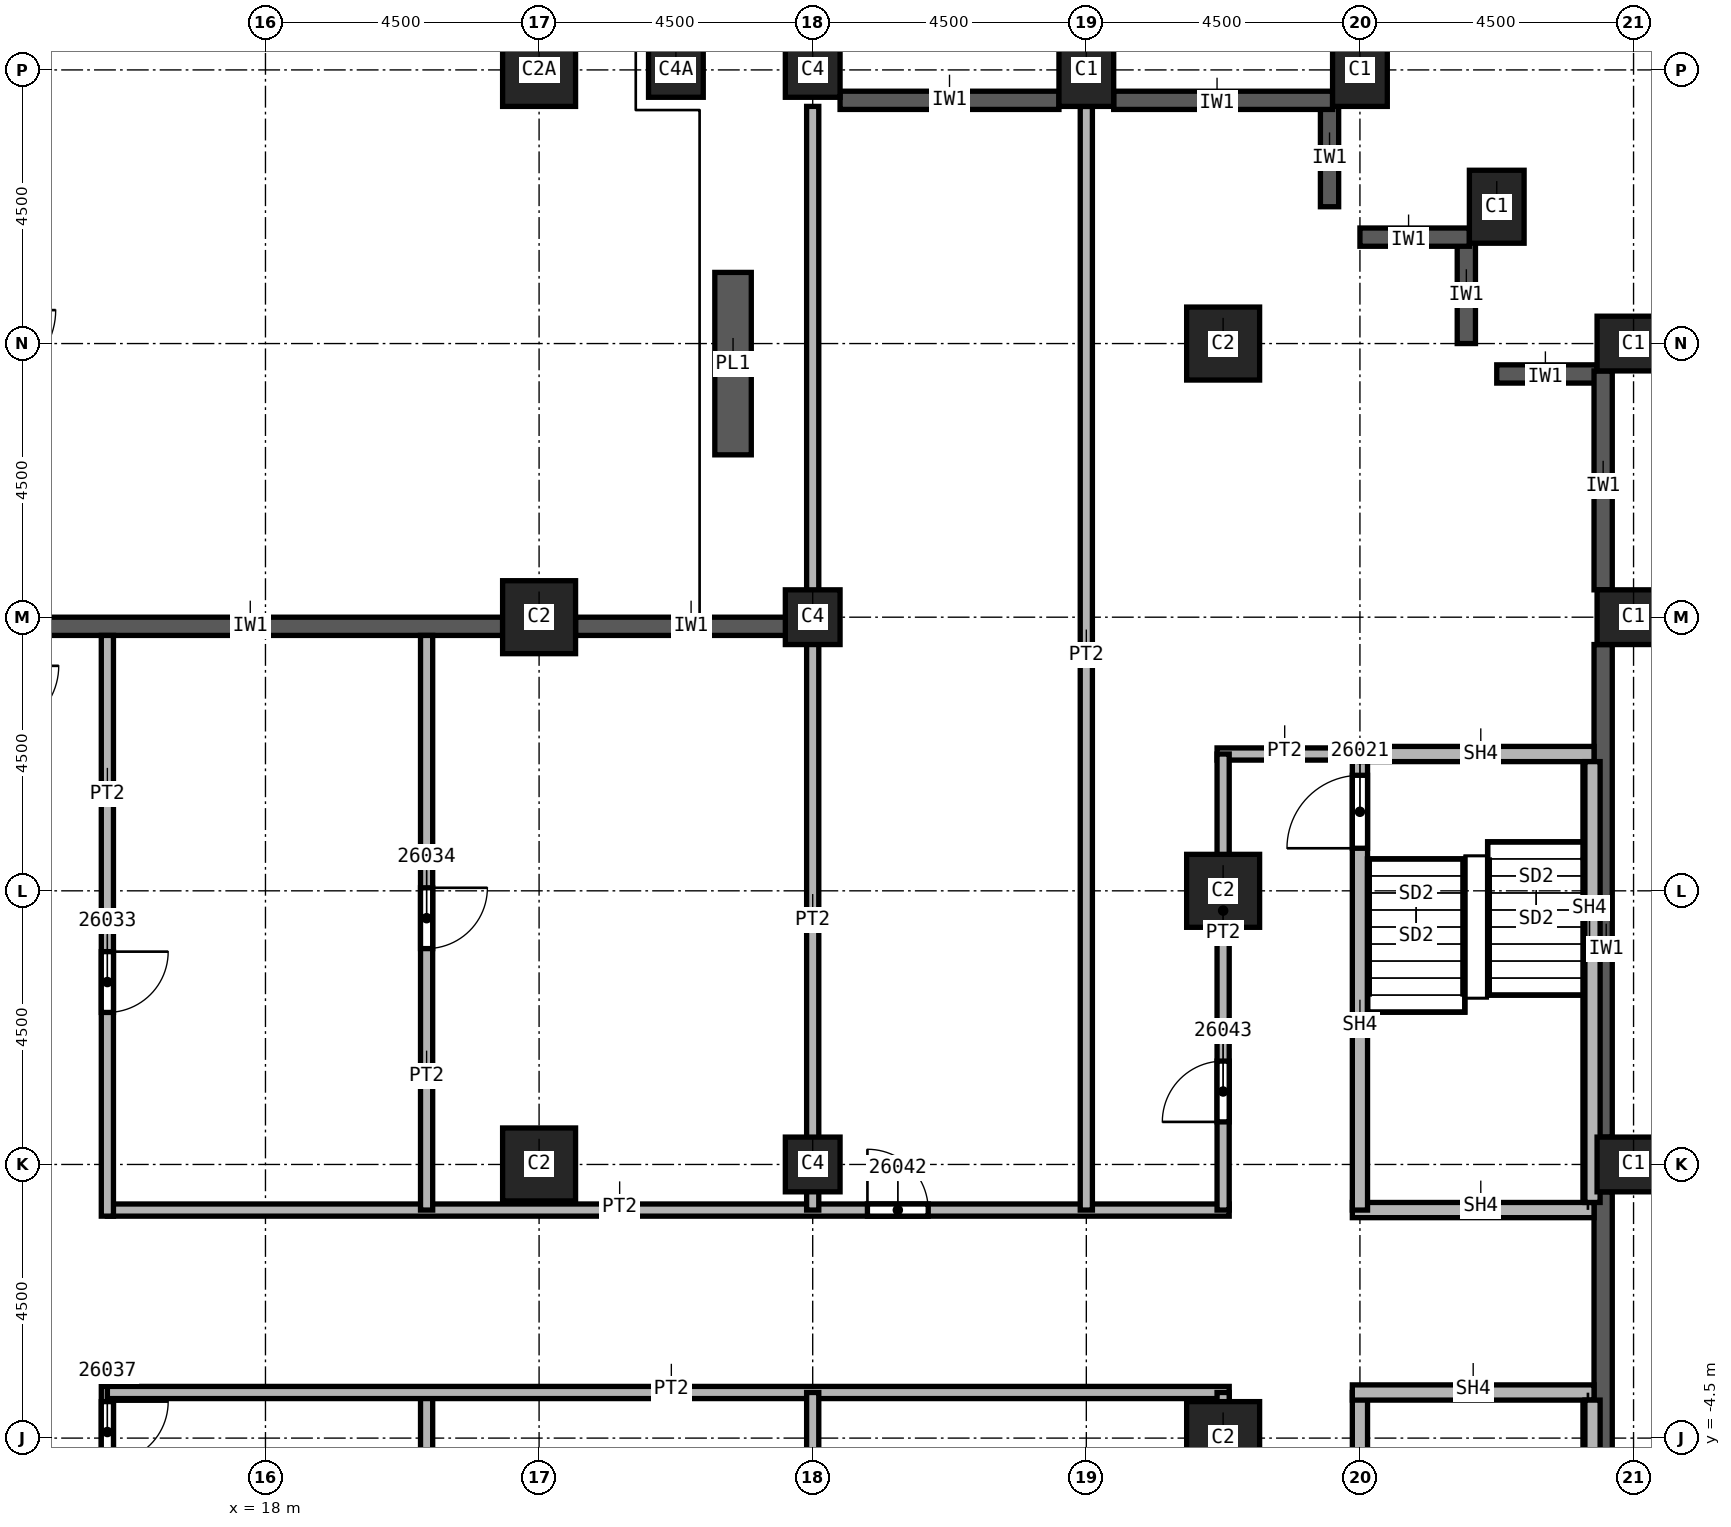
"""IFC4 building model, lengths in metres.
Left out: names, types, materials, properties, quantities, classifications, styles, units other than length and angle.
Written with IfcOpenShell. Run it as: python <this file> out.ifc"""

import sys

from ifc_helpers import new_model, si_unit, direction, frame, frame_2d, origin, origin_2d, place, context, subcontext, project, spatial, rectangle, extrude, element, fill, save


model = new_model("IFC4")
c1 = context("Model", 3, precision=1e-05, world=origin(), true_north=direction((0.0, 1.0)))
c2 = subcontext(c1, "Body", "Model", "MODEL_VIEW")
j1 = project(units=[si_unit("LENGTHUNIT", "METRE"), si_unit("PLANEANGLEUNIT", "RADIAN")], contexts=[c1])
p1 = place(None, origin())
s1 = spatial("IfcSite", under=j1, at=p1, CompositionType="ELEMENT")
p2 = place(p1, origin())
s2 = spatial("IfcBuilding", under=s1, at=p2, CompositionType="ELEMENT")
p3 = place(p2, frame((0.0, 0.0, 120.0)))
s3 = spatial("IfcBuildingStorey", under=s2, at=p3, CompositionType="ELEMENT", Elevation=120.0)
for number, where, z_axis, x_axis in (
    (1, (40.5, 0.0, 0.0), (0.0, 0.0, 1.0), (0.0, 1.0, 0.0)),
    (2, (40.5, 9.0, 0.0), (0.0, 0.0, 1.0), (0.0, 1.0, 0.0)),
    (3, (40.5, 13.5, 0.0), (0.0, 0.0, 1.0), (0.0, 1.0, 0.0)),
    (4, (38.25, 15.75, 0.0), (0.0, 0.0, 1.0), (1.0, 0.0, 0.0)),
    (5, (31.5, 18.0, 0.0), (0.0, 0.0, 1.0), (1.0, 0.0, 0.0)),
    (6, (36.0, 18.0, 0.0), (0.0, 0.0, 1.0), (1.0, 0.0, 0.0)),
):
    element("IfcColumn", number, at=place(p3, frame(where, z_axis=z_axis, x_axis=x_axis)), inside=s3, PredefinedType="COLUMN", context=c2, shape_type="SweptSolid", body=[
        extrude(rectangle(XDim=0.9, YDim=1.2, at=origin_2d()), origin(), (0.0, 0.0, 1.0), 5.7),
    ])
for number, where, z_axis, x_axis in (
    (7, (33.75, 4.5, 0.0), (0.0, 0.0, 1.0), (1.0, 0.0, 0.0)),
    (8, (33.75, 13.5, 0.0), (0.0, 0.0, 1.0), (1.0, 0.0, 0.0)),
    (9, (33.75, -4.5, 0.0), (0.0, 0.0, 1.0), (1.0, 0.0, 0.0)),
    (10, (22.5, 0.0, 0.0), (0.0, 0.0, 1.0), (1.0, 0.0, 0.0)),
    (11, (22.5, 9.0, 0.0), (0.0, 0.0, 1.0), (1.0, 0.0, 0.0)),
):
    element("IfcColumn", number, at=place(p3, frame(where, z_axis=z_axis, x_axis=x_axis)), inside=s3, PredefinedType="COLUMN", context=c2, shape_type="SweptSolid", body=[
        extrude(rectangle(XDim=1.2, YDim=1.2, at=origin_2d()), origin(), (0.0, 0.0, 1.0), 5.7),
    ])
p4 = place(p3, frame((22.5, 18.0, 0.0), z_axis=(0.0, 0.0, 1.0), x_axis=(1.0, 0.0, 0.0)))
e12 = element("IfcColumn", 12, at=p4, inside=s3, PredefinedType="COLUMN", context=c2, shape_type="SweptSolid", body=[
    extrude(rectangle(XDim=1.2, YDim=1.2, at=origin_2d()), origin(), (0.0, 0.0, 1.0), 6.0),
])
for number, where, z_axis, x_axis in (
    (13, (27.0, 0.0, 0.0), (0.0, 0.0, 1.0), (1.0, 0.0, 0.0)),
    (14, (27.0, 9.0, 0.0), (0.0, 0.0, 1.0), (1.0, 0.0, 0.0)),
    (15, (27.0, 18.0, 0.0), (0.0, 0.0, 1.0), (1.0, 0.0, 0.0)),
):
    element("IfcColumn", number, at=place(p3, frame(where, z_axis=z_axis, x_axis=x_axis)), inside=s3, PredefinedType="COLUMN", context=c2, shape_type="SweptSolid", body=[
        extrude(rectangle(XDim=0.9, YDim=0.9, at=origin_2d()), origin(), (0.0, 0.0, 1.0), 5.7),
    ])
p5 = place(p3, frame((24.75, 18.0, 0.0), z_axis=(0.0, 0.0, 1.0), x_axis=(1.0, 0.0, 0.0)))
e16 = element("IfcColumn", 16, at=p5, inside=s3, PredefinedType="COLUMN", context=c2, shape_type="SweptSolid", body=[
    extrude(rectangle(XDim=0.9, YDim=0.9, at=origin_2d()), origin(), (0.0, 0.0, 1.0), 6.0),
])
p6 = place(p3, frame((39.9, 13.0, 0.0), z_axis=(0.0, 0.0, 1.0), x_axis=(-1.0, 0.0, 0.0)))
e17 = element("IfcWall", 17, at=p6, inside=s3, PredefinedType="SOLIDWALL", context=c2, shape_type="SweptSolid", body=[
    extrude(rectangle(XDim=1.65, YDim=0.3, at=frame_2d((0.825, 0.0))), origin(), (0.0, 0.0, 1.0), 5.1),
])
for number, where, z_axis, x_axis in (
    (18, (37.75, 15.3, 0.0), (0.0, 0.0, 1.0), (0.0, -1.0, 0.0)),
    (19, (37.8, 15.25, 0.0), (0.0, 0.0, 1.0), (-1.0, 0.0, 0.0)),
    (20, (35.5, 17.55, 0.0), (0.0, 0.0, 1.0), (0.0, -1.0, 0.0)),
):
    element("IfcWall", number, at=place(p3, frame(where, z_axis=z_axis, x_axis=x_axis)), inside=s3, PredefinedType="SOLIDWALL", context=c2, shape_type="SweptSolid", body=[
        extrude(rectangle(XDim=1.8, YDim=0.3, at=frame_2d((0.9, 0.0))), origin(), (0.0, 0.0, 1.0), 5.1),
    ])
for number, where, z_axis, x_axis in (
    (21, (40.0, -8.55, 0.0), (0.0, 0.0, 1.0), (0.0, 1.0, 0.0)),
    (22, (40.0, 0.45, 0.0), (0.0, 0.0, 1.0), (0.0, 1.0, 0.0)),
):
    element("IfcWall", number, at=place(p3, frame(where, z_axis=z_axis, x_axis=x_axis)), inside=s3, PredefinedType="SOLIDWALL", context=c2, shape_type="SweptSolid", body=[
        extrude(rectangle(XDim=8.1, YDim=0.3, at=frame_2d((4.05, 0.0))), origin(), (0.0, 0.0, 1.0), 5.1),
    ])
for number, where, z_axis, x_axis in (
    (23, (40.0, 9.45, 0.0), (0.0, 0.0, 1.0), (0.0, 1.0, 0.0)),
    (24, (35.55, 17.5, 0.0), (0.0, 0.0, 1.0), (-1.0, 0.0, 0.0)),
    (25, (31.05, 17.5, 0.0), (0.0, 0.0, 1.0), (-1.0, 0.0, 0.0)),
):
    element("IfcWall", number, at=place(p3, frame(where, z_axis=z_axis, x_axis=x_axis)), inside=s3, PredefinedType="SOLIDWALL", context=c2, shape_type="SweptSolid", body=[
        extrude(rectangle(XDim=3.6, YDim=0.3, at=frame_2d((1.8, 0.0))), origin(), (0.0, 0.0, 1.0), 5.1),
    ])
p7 = place(p3, frame((21.9, 8.85, 0.0), z_axis=(0.0, 0.0, 1.0), x_axis=(-1.0, 0.0, 0.0)))
e26 = element("IfcWall", 26, at=p7, inside=s3, PredefinedType="SOLIDWALL", context=c2, shape_type="SweptSolid", body=[
    extrude(rectangle(XDim=8.35, YDim=0.3, at=frame_2d((4.175, 0.0))), origin(), (0.0, 0.0, 1.0), 5.1),
])
p8 = place(p3, frame((26.95, 8.85, 0.0), z_axis=(0.0, 0.0, 1.0), x_axis=(-1.0, 0.0, 0.0)))
e27 = element("IfcWall", 27, at=p8, inside=s3, PredefinedType="SOLIDWALL", context=c2, shape_type="SweptSolid", body=[
    extrude(rectangle(XDim=3.85, YDim=0.3, at=frame_2d((1.925, 0.0))), origin(), (0.0, 0.0, 1.0), 5.1),
])
p9 = place(p3, frame((25.69, 14.67, 0.0), z_axis=(0.0, 0.0, 1.0), x_axis=(0.0, -1.0, 0.0)))
e28 = element("IfcWall", 28, at=p9, inside=s3, PredefinedType="SOLIDWALL", context=c2, shape_type="SweptSolid", body=[
    extrude(rectangle(XDim=3.0, YDim=0.6, at=frame_2d((1.5, 0.0))), origin(), (0.0, 0.0, 1.0), 0.54),
])
p10 = place(p3, frame((15.4, -3.65, 0.0), z_axis=(0.0, 0.0, 1.0), x_axis=(0.0, -1.0, 0.0)))
e29 = element("IfcWall", 29, at=p10, inside=s3, PredefinedType="PARTITIONING", context=c2, shape_type="SweptSolid", body=[
    extrude(rectangle(XDim=20.5, YDim=0.2, at=frame_2d((10.25, 0.0))), origin(), (0.0, 0.0, 1.0), 5.7),
])
p11 = place(p10, frame((11.5, 0.0, 0.0)))
e30 = element("IfcOpeningElement", 30, at=p11, cuts=e29, PredefinedType="OPENING", context=c2, shape_type="SweptSolid", body=[
    extrude(rectangle(XDim=1.0, YDim=2.1, at=frame_2d((0.5, 1.05))), frame((0.0, 0.1, 0.0), z_axis=(0.0, -1.0, 0.0), x_axis=(1.0, 0.0, 0.0)), (0.0, 0.0, 1.0), 0.2),
])
p12 = place(p10, frame((0.25, 0.0, 0.0)))
e31 = element("IfcOpeningElement", 31, at=p12, cuts=e29, PredefinedType="OPENING", context=c2, shape_type="SweptSolid", body=[
    extrude(rectangle(XDim=1.0, YDim=2.1, at=frame_2d((0.5, 1.05))), frame((0.0, 0.1, 0.0), z_axis=(0.0, -1.0, 0.0), x_axis=(1.0, 0.0, 0.0)), (0.0, 0.0, 1.0), 0.2),
])
p13 = place(p3, frame((15.4, -0.75, 0.0), z_axis=(0.0, 0.0, 1.0), x_axis=(1.0, 0.0, 0.0)))
e32 = element("IfcWall", 32, at=p13, inside=s3, PredefinedType="PARTITIONING", context=c2, shape_type="SweptSolid", body=[
    extrude(rectangle(XDim=18.45, YDim=0.2, at=frame_2d((9.225, 0.0))), origin(), (0.0, 0.0, 1.0), 5.7),
])
p14 = place(p13, frame((12.5, 0.0, 0.0)))
e33 = element("IfcOpeningElement", 33, at=p14, cuts=e32, PredefinedType="OPENING", context=c2, shape_type="SweptSolid", body=[
    extrude(rectangle(XDim=1.0, YDim=2.1, at=frame_2d((0.5, 1.05))), frame((0.0, 0.1, 0.0), z_axis=(0.0, -1.0, 0.0), x_axis=(1.0, 0.0, 0.0)), (0.0, 0.0, 1.0), 0.2),
])
p15 = place(p3, frame((15.4, 8.7, 0.0), z_axis=(0.0, 0.0, 1.0), x_axis=(0.0, -1.0, 0.0)))
e34 = element("IfcWall", 34, at=p15, inside=s3, PredefinedType="PARTITIONING", context=c2, shape_type="SweptSolid", body=[
    extrude(rectangle(XDim=9.55, YDim=0.2, at=frame_2d((4.775, 0.0))), origin(), (0.0, 0.0, 1.0), 5.7),
])
p16 = place(p15, frame((5.2, 0.0, 0.0)))
e35 = element("IfcOpeningElement", 35, at=p16, cuts=e34, PredefinedType="OPENING", context=c2, shape_type="SweptSolid", body=[
    extrude(rectangle(XDim=1.0, YDim=2.1, at=frame_2d((0.5, 1.05))), frame((0.0, 0.1, 0.0), z_axis=(0.0, -1.0, 0.0), x_axis=(1.0, 0.0, 0.0)), (0.0, 0.0, 1.0), 0.2),
])
p17 = place(p3, frame((20.65, -3.75, 0.0), z_axis=(0.0, 0.0, 1.0), x_axis=(0.0, -1.0, 0.0)))
e36 = element("IfcWall", 36, at=p17, inside=s3, PredefinedType="PARTITIONING", context=c2, shape_type="SweptSolid", body=[
    extrude(rectangle(XDim=20.4, YDim=0.2, at=frame_2d((10.2, 0.0))), origin(), (0.0, 0.0, 1.0), 5.7),
])
p18 = place(p17, frame((10.5, 0.0, 0.0)))
e37 = element("IfcOpeningElement", 37, at=p18, cuts=e36, PredefinedType="OPENING", context=c2, shape_type="SweptSolid", body=[
    extrude(rectangle(XDim=1.0, YDim=2.1, at=frame_2d((0.5, 1.05))), frame((0.0, 0.1, 0.0), z_axis=(0.0, -1.0, 0.0), x_axis=(1.0, 0.0, 0.0)), (0.0, 0.0, 1.0), 0.2),
])
p19 = place(p17, frame((3.4, 0.0, 0.0)))
e38 = element("IfcOpeningElement", 38, at=p19, cuts=e36, PredefinedType="OPENING", context=c2, shape_type="SweptSolid", body=[
    extrude(rectangle(XDim=1.0, YDim=2.1, at=frame_2d((0.5, 1.05))), frame((0.0, 0.1, 0.0), z_axis=(0.0, -1.0, 0.0), x_axis=(1.0, 0.0, 0.0)), (0.0, 0.0, 1.0), 0.2),
])
p20 = place(p3, frame((20.65, 8.7, 0.0), z_axis=(0.0, 0.0, 1.0), x_axis=(0.0, -1.0, 0.0)))
e39 = element("IfcWall", 39, at=p20, inside=s3, PredefinedType="PARTITIONING", context=c2, shape_type="SweptSolid", body=[
    extrude(rectangle(XDim=9.45, YDim=0.2, at=frame_2d((4.725, 0.0))), origin(), (0.0, 0.0, 1.0), 5.7),
])
p21 = place(p20, frame((4.15, 0.0, 0.0)))
e40 = element("IfcOpeningElement", 40, at=p21, cuts=e39, PredefinedType="OPENING", context=c2, shape_type="SweptSolid", body=[
    extrude(rectangle(XDim=1.0, YDim=2.1, at=frame_2d((0.5, 1.05))), frame((0.0, 0.1, 0.0), z_axis=(0.0, -1.0, 0.0), x_axis=(1.0, 0.0, 0.0)), (0.0, 0.0, 1.0), 0.2),
])
p22 = place(p3, frame((33.85, -3.75, 0.0), z_axis=(0.0, 0.0, 1.0), x_axis=(-1.0, 0.0, 0.0)))
e41 = element("IfcWall", 41, at=p22, inside=s3, PredefinedType="PARTITIONING", context=c2, shape_type="SweptSolid", body=[
    extrude(rectangle(XDim=18.45, YDim=0.2, at=frame_2d((9.225, 0.0))), origin(), (0.0, 0.0, 1.0), 5.7),
])
p23 = place(p3, frame((27.0, -3.75, 0.0), z_axis=(0.0, 0.0, 1.0), x_axis=(0.0, -1.0, 0.0)))
e42 = element("IfcWall", 42, at=p23, inside=s3, PredefinedType="PARTITIONING", context=c2, shape_type="SweptSolid", body=[
    extrude(rectangle(XDim=13.65, YDim=0.2, at=frame_2d((6.825, 0.0))), origin(), (0.0, 0.0, 1.0), 5.7),
])
for number, where, z_axis, x_axis in (
    (43, (27.0, 17.4, 0.0), (0.0, 0.0, 1.0), (0.0, -1.0, 0.0)),
    (44, (31.5, 17.4, 0.0), (0.0, 0.0, 1.0), (0.0, -1.0, 0.0)),
):
    element("IfcWall", number, at=place(p3, frame(where, z_axis=z_axis, x_axis=x_axis)), inside=s3, PredefinedType="PARTITIONING", context=c2, shape_type="SweptSolid", body=[
        extrude(rectangle(XDim=18.15, YDim=0.2, at=frame_2d((9.075, 0.0))), origin(), (0.0, 0.0, 1.0), 5.7),
    ])
p24 = place(p3, frame((33.65, 6.75, 0.0), z_axis=(0.0, 0.0, 1.0), x_axis=(1.0, 0.0, 0.0)))
e45 = element("IfcWall", 45, at=p24, inside=s3, PredefinedType="PARTITIONING", context=c2, shape_type="SweptSolid", body=[
    extrude(rectangle(XDim=2.35, YDim=0.2, at=frame_2d((1.175, 0.0))), origin(), (0.0, 0.0, 1.0), 5.7),
])
p25 = place(p3, frame((33.75, -11.25, 0.0), z_axis=(0.0, 0.0, 1.0), x_axis=(0.0, 1.0, 0.0)))
e46 = element("IfcWall", 46, at=p25, inside=s3, PredefinedType="PARTITIONING", context=c2, shape_type="SweptSolid", body=[
    extrude(rectangle(XDim=7.5, YDim=0.2, at=frame_2d((3.75, 0.0))), origin(), (0.0, 0.0, 1.0), 5.7),
])
p26 = place(p25, frame((0.55, 0.0, 0.0)))
e47 = element("IfcOpeningElement", 47, at=p26, cuts=e46, PredefinedType="OPENING", context=c2, shape_type="SweptSolid", body=[
    extrude(rectangle(XDim=1.0, YDim=2.1, at=frame_2d((0.5, 1.05))), frame((0.0, 0.1, 0.0), z_axis=(0.0, -1.0, 0.0), x_axis=(1.0, 0.0, 0.0)), (0.0, 0.0, 1.0), 0.2),
])
p27 = place(p3, frame((33.75, -0.75, 0.0), z_axis=(0.0, 0.0, 1.0), x_axis=(0.0, 1.0, 0.0)))
e48 = element("IfcWall", 48, at=p27, inside=s3, PredefinedType="PARTITIONING", context=c2, shape_type="SweptSolid", body=[
    extrude(rectangle(XDim=7.5, YDim=0.2, at=frame_2d((3.75, 0.0))), origin(), (0.0, 0.0, 1.0), 5.7),
])
p28 = place(p27, frame((1.45, 0.0, 0.0)))
e49 = element("IfcOpeningElement", 49, at=p28, cuts=e48, PredefinedType="OPENING", context=c2, shape_type="SweptSolid", body=[
    extrude(rectangle(XDim=1.0, YDim=2.1, at=frame_2d((0.5, 1.05))), frame((0.0, 0.1, 0.0), z_axis=(0.0, -1.0, 0.0), x_axis=(1.0, 0.0, 0.0)), (0.0, 0.0, 1.0), 0.2),
])
p29 = place(p3, frame((35.875, -0.75, 0.0), z_axis=(0.0, 0.0, 1.0), x_axis=(1.0, 0.0, 0.0)))
e50 = element("IfcWall", 50, at=p29, inside=s3, PredefinedType="SOLIDWALL", context=c2, shape_type="SweptSolid", body=[
    extrude(rectangle(XDim=3.975, YDim=0.25, at=frame_2d((1.988, 0.0))), origin(), (0.0, 0.0, 1.0), 5.7),
])
p30 = place(p3, frame((36.0, -11.375, 0.0), z_axis=(0.0, 0.0, 1.0), x_axis=(0.0, 1.0, 0.0)))
e51 = element("IfcWall", 51, at=p30, inside=s3, PredefinedType="SOLIDWALL", context=c2, shape_type="SweptSolid", body=[
    extrude(rectangle(XDim=7.625, YDim=0.25, at=frame_2d((3.812, 0.0))), origin(), (0.0, 0.0, 1.0), 5.7),
])
p31 = place(p30, frame((0.4, 0.0, 0.0)))
e52 = element("IfcOpeningElement", 52, at=p31, cuts=e51, PredefinedType="OPENING", context=c2, shape_type="SweptSolid", body=[
    extrude(rectangle(XDim=1.2, YDim=2.1, at=frame_2d((0.6, 1.05))), frame((0.0, 0.125, 0.0), z_axis=(0.0, -1.0, 0.0), x_axis=(1.0, 0.0, 0.0)), (0.0, 0.0, 1.0), 0.25),
])
p32 = place(p3, frame((36.0, -0.75, 0.0), z_axis=(0.0, 0.0, 1.0), x_axis=(0.0, 1.0, 0.0)))
e53 = element("IfcWall", 53, at=p32, inside=s3, PredefinedType="SOLIDWALL", context=c2, shape_type="SweptSolid", body=[
    extrude(rectangle(XDim=7.625, YDim=0.25, at=frame_2d((3.812, 0.0))), origin(), (0.0, 0.0, 1.0), 5.7),
])
p33 = place(p32, frame((5.95, 0.0, 0.0)))
e54 = element("IfcOpeningElement", 54, at=p33, cuts=e53, PredefinedType="OPENING", context=c2, shape_type="SweptSolid", body=[
    extrude(rectangle(XDim=1.2, YDim=2.1, at=frame_2d((0.6, 1.05))), frame((0.0, 0.125, 0.0), z_axis=(0.0, -1.0, 0.0), x_axis=(1.0, 0.0, 0.0)), (0.0, 0.0, 1.0), 0.25),
])
p34 = place(p3, frame((36.0, 6.75, 0.0), z_axis=(0.0, 0.0, 1.0), x_axis=(1.0, 0.0, 0.0)))
e55 = element("IfcWall", 55, at=p34, inside=s3, PredefinedType="SOLIDWALL", context=c2, shape_type="SweptSolid", body=[
    extrude(rectangle(XDim=3.85, YDim=0.25, at=frame_2d((1.925, 0.0))), origin(), (0.0, 0.0, 1.0), 5.7),
])
p35 = place(p3, frame((39.85, -3.75, 0.0), z_axis=(0.0, 0.0, 1.0), x_axis=(-1.0, 0.0, 0.0)))
e56 = element("IfcWall", 56, at=p35, inside=s3, PredefinedType="SOLIDWALL", context=c2, shape_type="SweptSolid", body=[
    extrude(rectangle(XDim=3.975, YDim=0.25, at=frame_2d((1.988, 0.0))), origin(), (0.0, 0.0, 1.0), 5.7),
])
for number, where, z_axis, x_axis in (
    (57, (39.825, -11.125, 0.0), (0.0, 0.0, 1.0), (0.0, 1.0, 0.0)),
    (58, (39.825, -0.625, 0.0), (0.0, 0.0, 1.0), (0.0, 1.0, 0.0)),
):
    element("IfcWall", number, at=place(p3, frame(where, z_axis=z_axis, x_axis=x_axis)), inside=s3, PredefinedType="SOLIDWALL", context=c2, shape_type="SweptSolid", body=[
        extrude(rectangle(XDim=7.25, YDim=0.25, at=frame_2d((3.625, 0.0))), origin(), (0.0, 0.0, 1.0), 5.7),
    ])
p36 = place(p33, origin())
e59 = element("IfcDoor", 59, at=p36, inside=s3, OperationType="SINGLE_SWING_RIGHT", PredefinedType="DOOR", context=c2, shape_type="SweptSolid", body=[
    extrude(rectangle(XDim=1.2, YDim=2.1, at=frame_2d((0.6, 1.05))), frame((0.0, 0.025, 0.0), z_axis=(0.0, -1.0, 0.0), x_axis=(1.0, 0.0, 0.0)), (0.0, 0.0, 1.0), 0.05),
])
fill(e54, e59)
p37 = place(p16, origin())
e60 = element("IfcDoor", 60, at=p37, inside=s3, OperationType="SINGLE_SWING_RIGHT", PredefinedType="DOOR", context=c2, shape_type="SweptSolid", body=[
    extrude(rectangle(XDim=1.0, YDim=2.1, at=frame_2d((0.5, 1.05))), frame((0.0, 0.025, 0.0), z_axis=(0.0, -1.0, 0.0), x_axis=(1.0, 0.0, 0.0)), (0.0, 0.0, 1.0), 0.05),
])
fill(e35, e60)
p38 = place(p21, origin())
e61 = element("IfcDoor", 61, at=p38, inside=s3, OperationType="SINGLE_SWING_LEFT", PredefinedType="DOOR", context=c2, shape_type="SweptSolid", body=[
    extrude(rectangle(XDim=1.0, YDim=2.1, at=frame_2d((0.5, 1.05))), frame((0.0, 0.025, 0.0), z_axis=(0.0, -1.0, 0.0), x_axis=(1.0, 0.0, 0.0)), (0.0, 0.0, 1.0), 0.05),
])
fill(e40, e61)
p39 = place(p12, origin())
e62 = element("IfcDoor", 62, at=p39, inside=s3, OperationType="SINGLE_SWING_RIGHT", PredefinedType="DOOR", context=c2, shape_type="SweptSolid", body=[
    extrude(rectangle(XDim=1.0, YDim=2.1, at=frame_2d((0.5, 1.05))), frame((0.0, 0.025, 0.0), z_axis=(0.0, -1.0, 0.0), x_axis=(1.0, 0.0, 0.0)), (0.0, 0.0, 1.0), 0.05),
])
fill(e31, e62)
p40 = place(p14, origin())
e63 = element("IfcDoor", 63, at=p40, inside=s3, OperationType="SINGLE_SWING_LEFT", PredefinedType="DOOR", context=c2, shape_type="SweptSolid", body=[
    extrude(rectangle(XDim=1.0, YDim=2.1, at=frame_2d((0.5, 1.05))), frame((0.0, 0.025, 0.0), z_axis=(0.0, -1.0, 0.0), x_axis=(1.0, 0.0, 0.0)), (0.0, 0.0, 1.0), 0.05),
])
fill(e33, e63)
p41 = place(p28, origin())
e64 = element("IfcDoor", 64, at=p41, inside=s3, OperationType="SINGLE_SWING_RIGHT", PredefinedType="DOOR", context=c2, shape_type="SweptSolid", body=[
    extrude(rectangle(XDim=1.0, YDim=2.1, at=frame_2d((0.5, 1.05))), frame((0.0, 0.025, 0.0), z_axis=(0.0, -1.0, 0.0), x_axis=(1.0, 0.0, 0.0)), (0.0, 0.0, 1.0), 0.05),
])
fill(e49, e64)
save(model, sys.argv[1])
